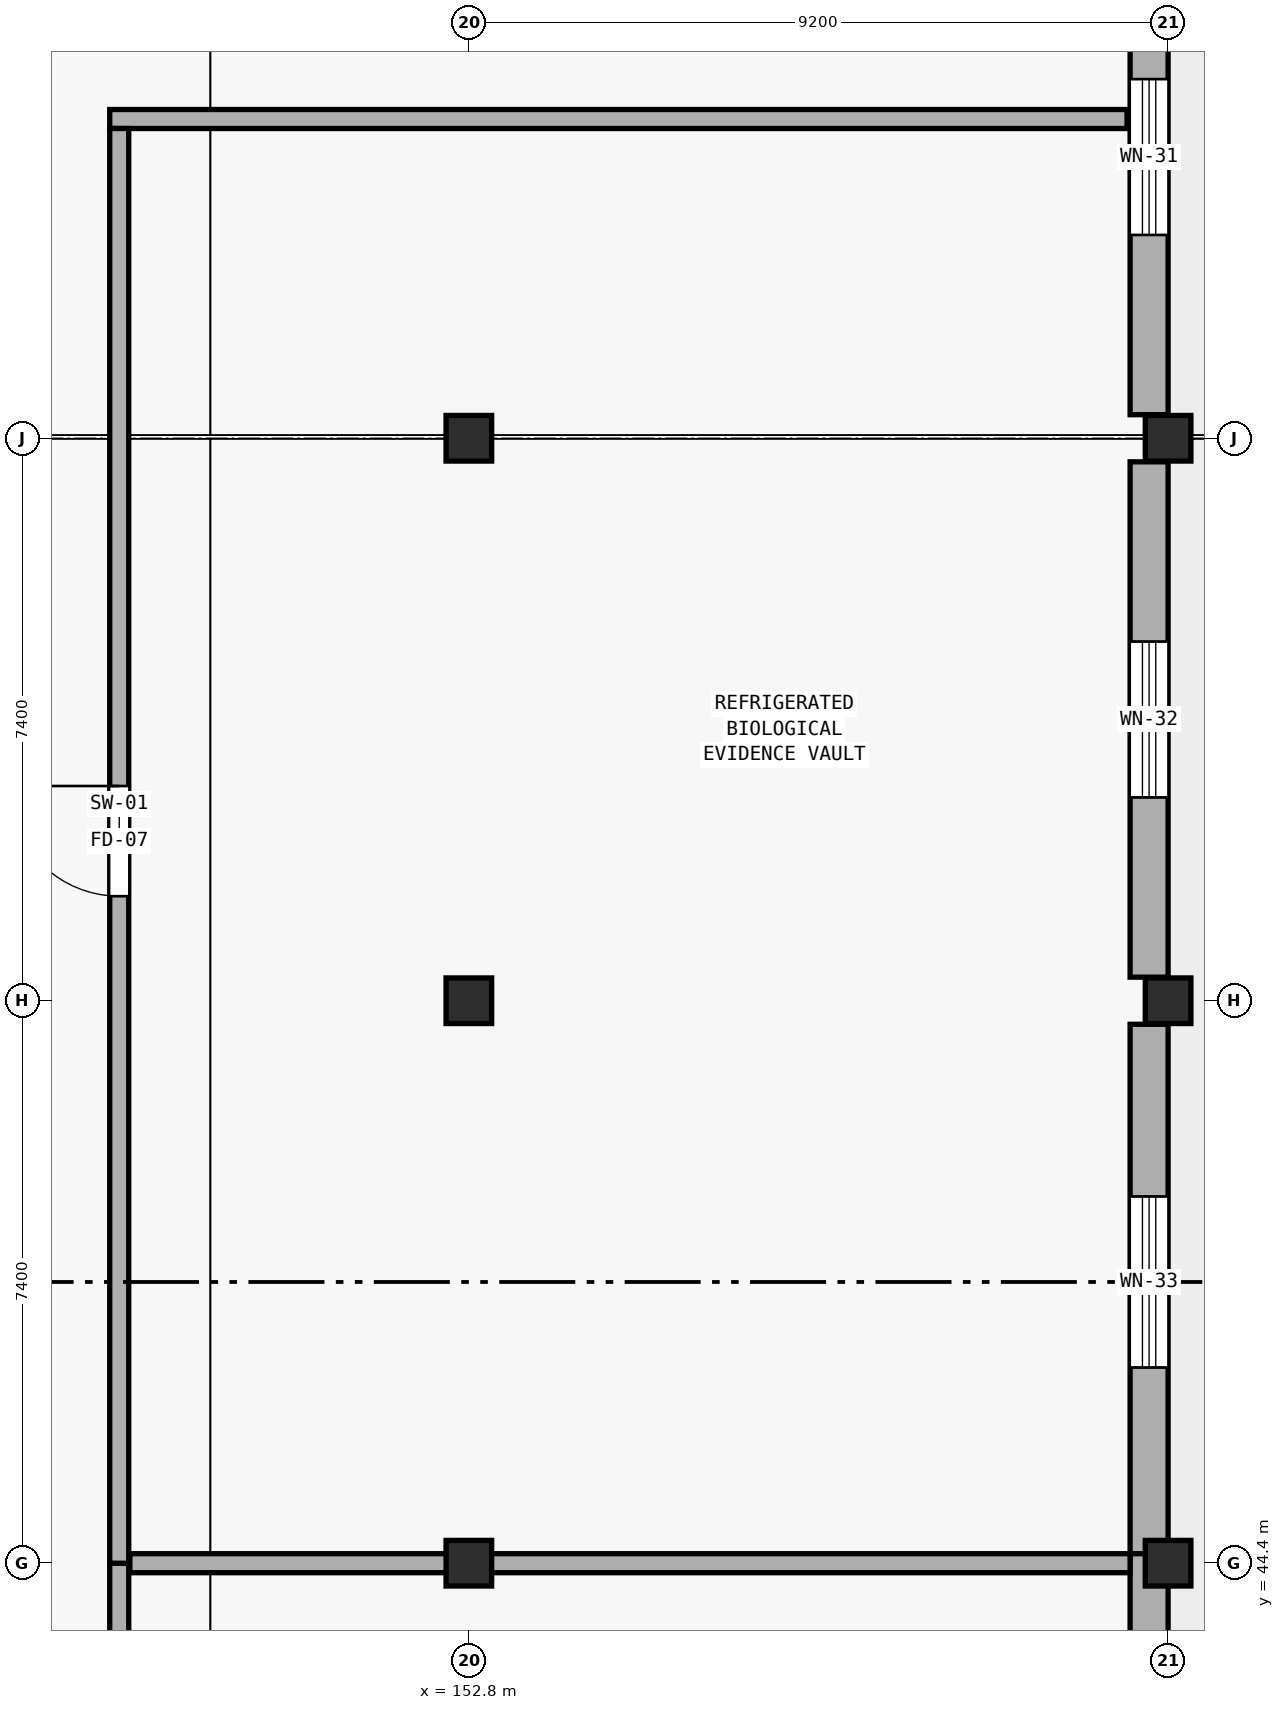
"""IFC4 building model, lengths in metres.
Left out: names, types, materials, properties, quantities, classifications, styles, units other than length and angle.
Written with IfcOpenShell. Run it as: python <this file> out.ifc"""

import sys

from ifc_helpers import new_model, si_unit, direction, frame, frame_2d, origin, origin_2d, place, context, subcontext, project, spatial, rectangle, extrude, element, fill, save


model = new_model("IFC4")
c1 = context("Model", 3, precision=1e-05, world=origin(), true_north=direction((0.0, 1.0)))
c2 = subcontext(c1, "Body", "Model", "MODEL_VIEW")
j1 = project(units=[si_unit("LENGTHUNIT", "METRE"), si_unit("PLANEANGLEUNIT", "RADIAN")], contexts=[c1])
p1 = place(None, origin())
s1 = spatial("IfcSite", under=j1, at=p1, CompositionType="ELEMENT")
p2 = place(p1, origin())
s2 = spatial("IfcBuilding", under=s1, at=p2, CompositionType="ELEMENT")
p3 = place(p2, origin())
s3 = spatial("IfcBuildingStorey", under=s2, at=p3, CompositionType="ELEMENT", Elevation=0.0)
for number, where, z_axis, x_axis in (
    (1, (152.8, 44.4, 0.0), (0.0, 0.0, 1.0), (1.0, 0.0, 0.0)),
    (2, (152.8, 51.8, 0.0), (0.0, 0.0, 1.0), (1.0, 0.0, 0.0)),
    (3, (152.8, 59.2, 0.0), (0.0, 0.0, 1.0), (1.0, 0.0, 0.0)),
    (4, (162.0, 44.4, 0.0), (0.0, 0.0, 1.0), (1.0, 0.0, 0.0)),
    (5, (162.0, 51.8, 0.0), (0.0, 0.0, 1.0), (1.0, 0.0, 0.0)),
    (6, (162.0, 59.2, 0.0), (0.0, 0.0, 1.0), (1.0, 0.0, 0.0)),
):
    element("IfcColumn", number, at=place(p3, frame(where, z_axis=z_axis, x_axis=x_axis)), inside=s3, PredefinedType="COLUMN", context=c2, shape_type="SweptSolid", body=[
        extrude(rectangle(XDim=0.6, YDim=0.6, at=origin_2d()), origin(), (0.0, 0.0, 1.0), 5.4),
    ])
p4 = place(p3, frame((161.75, 66.29, 0.0), z_axis=(0.0, 0.0, 1.0), x_axis=(0.0, -1.0, 0.0)))
e7 = element("IfcWall", 7, at=p4, inside=s3, PredefinedType="STANDARD", context=c2, shape_type="SweptSolid", body=[
    extrude(rectangle(XDim=6.78, YDim=0.5, at=frame_2d((3.39, 0.0))), origin(), (0.0, 0.0, 1.0), 5.155),
])
p5 = place(p4, frame((2.365, 0.0, 1.35)))
e8 = element("IfcOpeningElement", 8, at=p5, cuts=e7, PredefinedType="OPENING", context=c2, shape_type="SweptSolid", body=[
    extrude(rectangle(XDim=2.05, YDim=1.35, at=frame_2d((1.025, 0.675))), frame((0.0, 0.26, 0.0), z_axis=(0.0, -1.0, 0.0), x_axis=(1.0, 0.0, 0.0)), (0.0, 0.0, 1.0), 0.52),
])
p6 = place(p3, frame((161.75, 58.89, 0.0), z_axis=(0.0, 0.0, 1.0), x_axis=(0.0, -1.0, 0.0)))
e9 = element("IfcWall", 9, at=p6, inside=s3, PredefinedType="STANDARD", context=c2, shape_type="SweptSolid", body=[
    extrude(rectangle(XDim=6.78, YDim=0.5, at=frame_2d((3.39, 0.0))), origin(), (0.0, 0.0, 1.0), 5.155),
])
p7 = place(p6, frame((2.365, 0.0, 0.9)))
e10 = element("IfcOpeningElement", 10, at=p7, cuts=e9, PredefinedType="OPENING", context=c2, shape_type="SweptSolid", body=[
    extrude(rectangle(XDim=2.05, YDim=1.75, at=frame_2d((1.025, 0.875))), frame((0.0, 0.26, 0.0), z_axis=(0.0, -1.0, 0.0), x_axis=(1.0, 0.0, 0.0)), (0.0, 0.0, 1.0), 0.52),
])
p8 = place(p3, frame((161.75, 51.49, 0.0), z_axis=(0.0, 0.0, 1.0), x_axis=(0.0, -1.0, 0.0)))
e11 = element("IfcWall", 11, at=p8, inside=s3, PredefinedType="STANDARD", context=c2, shape_type="SweptSolid", body=[
    extrude(rectangle(XDim=7.215, YDim=0.5, at=frame_2d((3.607, 0.0))), origin(), (0.0, 0.0, 1.0), 5.155),
])
p9 = place(p8, frame((2.265, 0.0, 1.35)))
e12 = element("IfcOpeningElement", 12, at=p9, cuts=e11, PredefinedType="OPENING", context=c2, shape_type="SweptSolid", body=[
    extrude(rectangle(XDim=2.25, YDim=1.55, at=frame_2d((1.125, 0.775))), frame((0.0, 0.26, 0.0), z_axis=(0.0, -1.0, 0.0), x_axis=(1.0, 0.0, 0.0)), (0.0, 0.0, 1.0), 0.52),
])
p10 = place(p3, frame((161.75, 44.525, 0.0), z_axis=(0.0, 0.0, 1.0), x_axis=(0.0, -1.0, 0.0)))
e13 = element("IfcWall", 13, at=p10, inside=s3, PredefinedType="STANDARD", context=c2, shape_type="SweptSolid", body=[
    extrude(rectangle(XDim=7.215, YDim=0.5, at=frame_2d((3.607, 0.0))), origin(), (0.0, 0.0, 1.0), 5.155),
])
p11 = place(p10, frame((2.6, 0.0, 0.9)))
e14 = element("IfcOpeningElement", 14, at=p11, cuts=e13, PredefinedType="OPENING", context=c2, shape_type="SweptSolid", body=[
    extrude(rectangle(XDim=2.45, YDim=2.2, at=frame_2d((1.225, 1.1))), frame((0.0, 0.26, 0.0), z_axis=(0.0, -1.0, 0.0), x_axis=(1.0, 0.0, 0.0)), (0.0, 0.0, 1.0), 0.52),
])
p12 = place(p3, frame((148.34, 44.4, 0.0), z_axis=(0.0, 0.0, 1.0), x_axis=(1.0, 0.0, 0.0)))
e15 = element("IfcWall", 15, at=p12, inside=s3, PredefinedType="SOLIDWALL", context=c2, shape_type="SweptSolid", body=[
    extrude(rectangle(XDim=13.16, YDim=0.25, at=frame_2d((6.58, 0.0))), origin(), (0.0, 0.0, 1.0), 4.285),
])
p13 = place(p3, frame((148.2, 21.94, 0.0), z_axis=(0.0, 0.0, 1.0), x_axis=(0.0, 1.0, 0.0)))
e16 = element("IfcWall", 16, at=p13, inside=s3, PredefinedType="SOLIDWALL", context=c2, shape_type="SweptSolid", body=[
    extrude(rectangle(XDim=22.46, YDim=0.25, at=frame_2d((11.23, 0.0))), origin(), (0.0, 0.0, 1.0), 4.285),
])
p14 = place(p13, frame((10.435, 0.0, 0.0)))
e17 = element("IfcOpeningElement", 17, at=p14, cuts=e16, PredefinedType="OPENING", context=c2, shape_type="SweptSolid", body=[
    extrude(rectangle(XDim=1.45, YDim=2.3, at=frame_2d((0.725, 1.15))), frame((0.0, 0.135, 0.0), z_axis=(0.0, -1.0, 0.0), x_axis=(1.0, 0.0, 0.0)), (0.0, 0.0, 1.0), 0.27),
])
p15 = place(p3, frame((148.075, 63.4, 0.0), z_axis=(0.0, 0.0, 1.0), x_axis=(1.0, 0.0, 0.0)))
e18 = element("IfcWall", 18, at=p15, inside=s3, PredefinedType="SOLIDWALL", context=c2, shape_type="SweptSolid", body=[
    extrude(rectangle(XDim=13.385, YDim=0.25, at=frame_2d((6.692, 0.0))), origin(), (0.0, 0.0, 1.0), 4.285),
])
p16 = place(p3, frame((148.2, 44.4, 0.0), z_axis=(0.0, 0.0, 1.0), x_axis=(0.0, 1.0, 0.0)))
e19 = element("IfcWall", 19, at=p16, inside=s3, PredefinedType="SOLIDWALL", context=c2, shape_type="SweptSolid", body=[
    extrude(rectangle(XDim=18.875, YDim=0.25, at=frame_2d((9.438, 0.0))), origin(), (0.0, 0.0, 1.0), 4.285),
])
p17 = place(p16, frame((8.775, 0.0, 0.0)))
e20 = element("IfcOpeningElement", 20, at=p17, cuts=e19, PredefinedType="OPENING", context=c2, shape_type="SweptSolid", body=[
    extrude(rectangle(XDim=1.45, YDim=2.3, at=frame_2d((0.725, 1.15))), frame((0.0, 0.135, 0.0), z_axis=(0.0, -1.0, 0.0), x_axis=(1.0, 0.0, 0.0)), (0.0, 0.0, 1.0), 0.27),
])
p18 = place(p5, origin())
e21 = element("IfcWindow", 21, at=p18, inside=s3, PartitioningType="SINGLE_PANEL", PredefinedType="WINDOW", context=c2, shape_type="SweptSolid", body=[
    extrude(rectangle(XDim=2.05, YDim=1.35, at=frame_2d((1.025, 0.675))), frame((0.0, 0.03, 0.0), z_axis=(0.0, -1.0, 0.0), x_axis=(1.0, 0.0, 0.0)), (0.0, 0.0, 1.0), 0.06),
])
fill(e8, e21)
p19 = place(p7, origin())
e22 = element("IfcWindow", 22, at=p19, inside=s3, PartitioningType="SINGLE_PANEL", PredefinedType="WINDOW", context=c2, shape_type="SweptSolid", body=[
    extrude(rectangle(XDim=2.05, YDim=1.75, at=frame_2d((1.025, 0.875))), frame((0.0, 0.03, 0.0), z_axis=(0.0, -1.0, 0.0), x_axis=(1.0, 0.0, 0.0)), (0.0, 0.0, 1.0), 0.06),
])
fill(e10, e22)
p20 = place(p9, origin())
e23 = element("IfcWindow", 23, at=p20, inside=s3, PartitioningType="SINGLE_PANEL", PredefinedType="WINDOW", context=c2, shape_type="SweptSolid", body=[
    extrude(rectangle(XDim=2.25, YDim=1.55, at=frame_2d((1.125, 0.775))), frame((0.0, 0.03, 0.0), z_axis=(0.0, -1.0, 0.0), x_axis=(1.0, 0.0, 0.0)), (0.0, 0.0, 1.0), 0.06),
])
fill(e12, e23)
p21 = place(p17, origin())
e24 = element("IfcDoor", 24, at=p21, inside=s3, OperationType="SINGLE_SWING_RIGHT", PredefinedType="DOOR", context=c2, shape_type="SweptSolid", body=[
    extrude(rectangle(XDim=1.45, YDim=2.3, at=frame_2d((0.725, 1.15))), frame((0.0, 0.025, 0.0), z_axis=(0.0, -1.0, 0.0), x_axis=(1.0, 0.0, 0.0)), (0.0, 0.0, 1.0), 0.05),
])
fill(e20, e24)
save(model, sys.argv[1])
